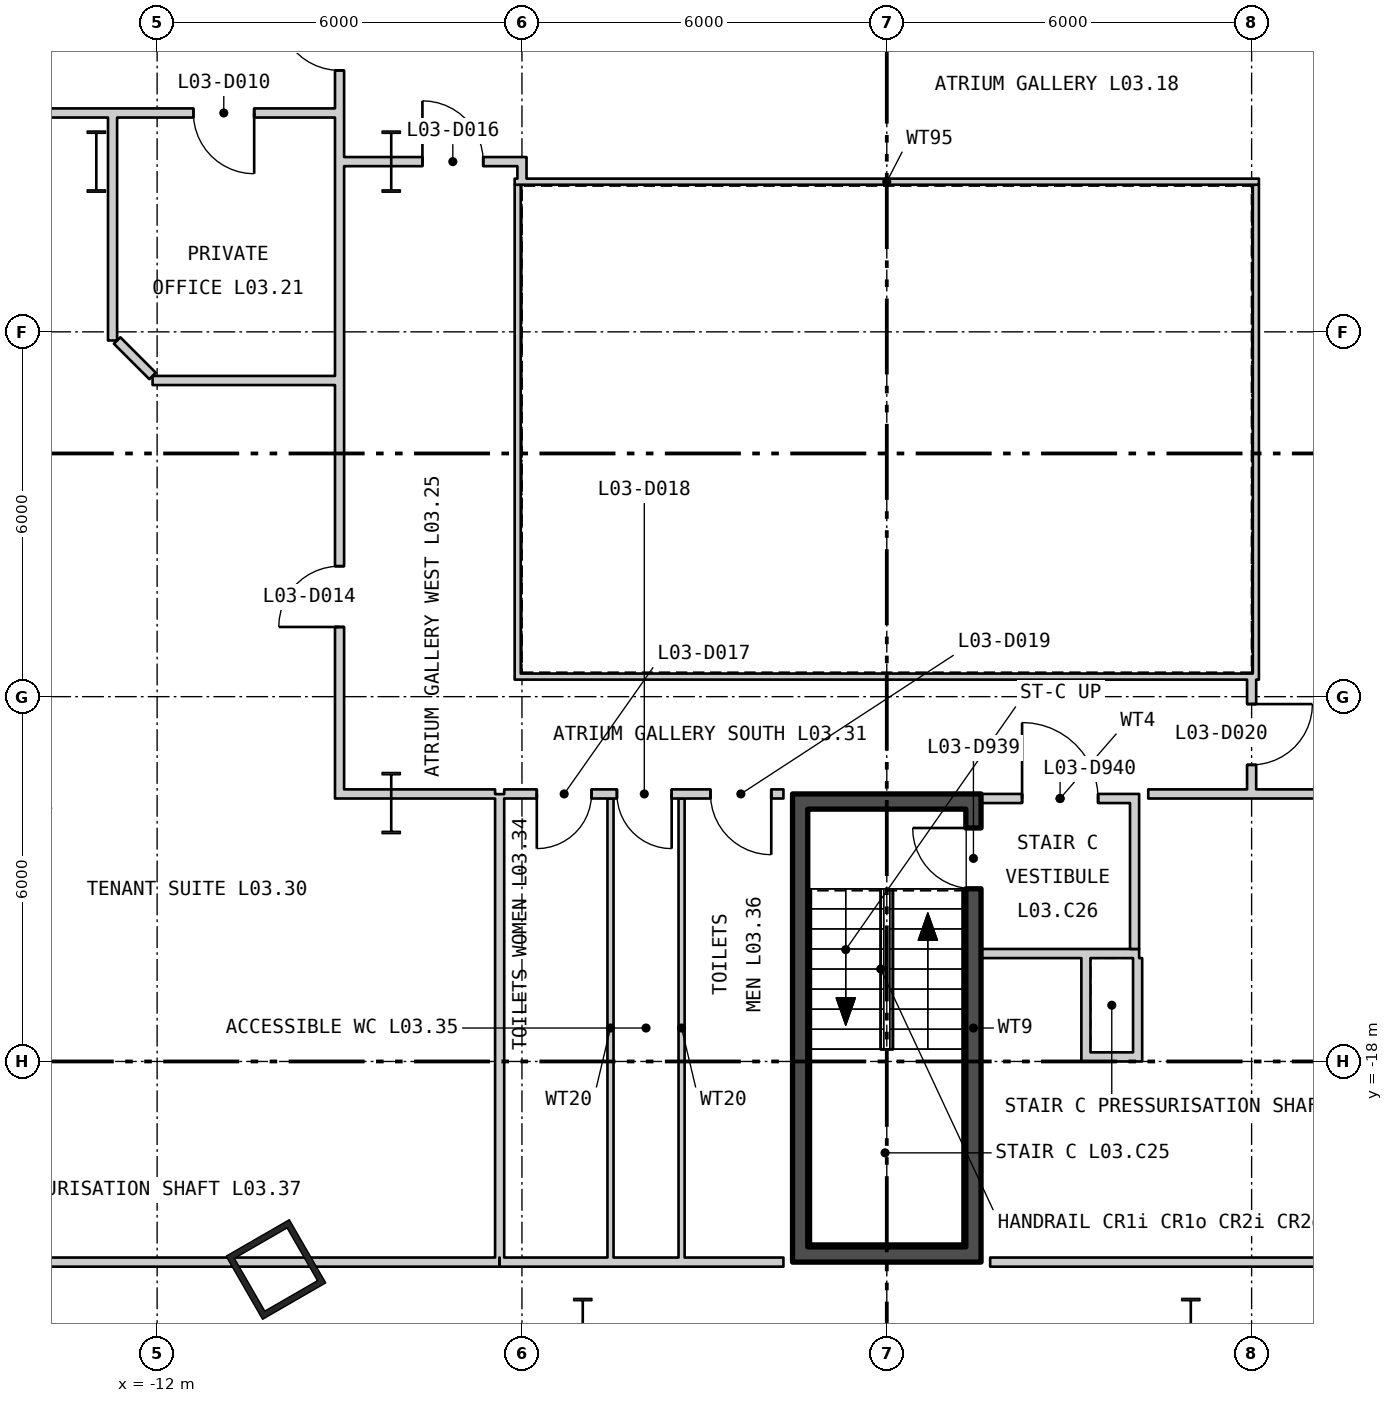
"""IFC4 building model, lengths in metres.
Left out: names, types, materials, properties, quantities, classifications, styles, units other than length and angle.
Written with IfcOpenShell. Run it as: python <this file> out.ifc"""

import sys

from ifc_helpers import new_model, si_unit, direction, frame, frame_2d, origin, origin_2d, place, context, subcontext, project, spatial, rectangle, hollow_rectangle, i_section, extrude, element, fill, save


model = new_model("IFC4")
c1 = context("Model", 3, precision=1e-05, world=origin(), true_north=direction((0.0, 1.0)))
c2 = subcontext(c1, "Body", "Model", "MODEL_VIEW")
j1 = project(units=[si_unit("LENGTHUNIT", "METRE"), si_unit("PLANEANGLEUNIT", "RADIAN")], contexts=[c1])
p1 = place(None, origin())
s1 = spatial("IfcSite", under=j1, at=p1, CompositionType="ELEMENT")
p2 = place(p1, origin())
s2 = spatial("IfcBuilding", under=s1, at=p2, CompositionType="ELEMENT")
p3 = place(p2, frame((0.0, 0.0, 18.6)))
s3 = spatial("IfcBuildingStorey", under=s2, at=p3, CompositionType="ELEMENT", Elevation=18.6)
p4 = place(p3, frame((-10.046, -21.422, 0.0), z_axis=(0.0, 0.0, 1.0), x_axis=(0.5, -0.866025403784, 0.0)))
e1 = element("IfcColumn", 1, at=p4, inside=s3, PredefinedType="COLUMN", context=c2, shape_type="SweptSolid", body=[
    extrude(hollow_rectangle(XDim=1.2, YDim=1.2, WallThickness=0.1, at=origin_2d()), origin(), (0.0, 0.0, 1.0), 5.1),
])
for number, where, z_axis, x_axis in (
    (2, (-8.15, -3.2, 0.0), (0.0, 0.0, 1.0), (1.0, 0.0, 0.0)),
    (3, (-8.15, -13.75, 0.0), (0.0, 0.0, 1.0), (1.0, 0.0, 0.0)),
    (4, (5.0, -22.4, 0.0), (0.0, 0.0, 1.0), (1.0, 0.0, 0.0)),
    (5, (-5.0, -22.4, 0.0), (0.0, 0.0, 1.0), (1.0, 0.0, 0.0)),
    (6, (-13.0, -3.2, 0.0), (0.0, 0.0, 1.0), (1.0, 0.0, 0.0)),
):
    element("IfcColumn", number, at=place(p3, frame(where, z_axis=z_axis, x_axis=x_axis)), inside=s3, PredefinedType="COLUMN", context=c2, shape_type="SweptSolid", body=[
        extrude(i_section(OverallWidth=0.302, OverallDepth=1.008, WebThickness=0.021, FlangeThickness=0.04, at=origin_2d()), origin(), (0.0, 0.0, 1.0), 5.1),
    ])
p5 = place(p3, frame((-6.12, -11.67, 0.0), z_axis=(0.0, 0.0, 1.0), x_axis=(1.0, 0.0, 0.0)))
e7 = element("IfcWall", 7, at=p5, inside=s3, PredefinedType="PARTITIONING", context=c2, shape_type="SweptSolid", body=[
    extrude(rectangle(XDim=12.24, YDim=0.1, at=frame_2d((6.12, 0.0))), origin(), (0.0, 0.0, 1.0), 4.88),
])
p6 = place(p3, frame((6.07, -11.62, 0.0), z_axis=(0.0, 0.0, 1.0), x_axis=(0.0, 1.0, 0.0)))
e8 = element("IfcWall", 8, at=p6, inside=s3, PredefinedType="PARTITIONING", context=c2, shape_type="SweptSolid", body=[
    extrude(rectangle(XDim=8.04, YDim=0.1, at=frame_2d((4.02, 0.0))), origin(), (0.0, 0.0, 1.0), 4.88),
])
p7 = place(p3, frame((6.12, -3.53, 0.0), z_axis=(0.0, 0.0, 1.0), x_axis=(-1.0, 0.0, 0.0)))
e9 = element("IfcWall", 9, at=p7, inside=s3, PredefinedType="PARTITIONING", context=c2, shape_type="SweptSolid", body=[
    extrude(rectangle(XDim=12.24, YDim=0.1, at=frame_2d((6.12, 0.0))), origin(), (0.0, 0.0, 1.0), 4.88),
])
p8 = place(p3, frame((-6.07, -3.58, 0.0), z_axis=(0.0, 0.0, 1.0), x_axis=(0.0, -1.0, 0.0)))
e10 = element("IfcWall", 10, at=p8, inside=s3, PredefinedType="PARTITIONING", context=c2, shape_type="SweptSolid", body=[
    extrude(rectangle(XDim=8.04, YDim=0.1, at=frame_2d((4.02, 0.0))), origin(), (0.0, 0.0, 1.0), 4.88),
])
p9 = place(p3, frame((-1.425, -21.05, 0.0), z_axis=(0.0, 0.0, 1.0), x_axis=(0.0, 1.0, 0.0)))
e11 = element("IfcWall", 11, at=p9, inside=s3, PredefinedType="SHEAR", context=c2, shape_type="SweptSolid", body=[
    extrude(rectangle(XDim=7.2, YDim=0.25, at=frame_2d((3.6, 0.0))), origin(), (0.0, 0.0, 1.0), 4.88),
])
p10 = place(p3, frame((1.425, -21.05, 0.0), z_axis=(0.0, 0.0, 1.0), x_axis=(0.0, 1.0, 0.0)))
e12 = element("IfcWall", 12, at=p10, inside=s3, PredefinedType="SHEAR", context=c2, shape_type="SweptSolid", body=[
    extrude(rectangle(XDim=7.2, YDim=0.25, at=frame_2d((3.6, 0.0))), origin(), (0.0, 0.0, 1.0), 4.88),
])
p11 = place(p10, frame((5.89, 0.0, 0.0)))
e13 = element("IfcOpeningElement", 13, at=p11, cuts=e12, PredefinedType="OPENING", context=c2, shape_type="SweptSolid", body=[
    extrude(rectangle(XDim=1.0, YDim=2.1, at=frame_2d((0.5, 1.05))), frame((0.0, 0.135, 0.0), z_axis=(0.0, -1.0, 0.0), x_axis=(1.0, 0.0, 0.0)), (0.0, 0.0, 1.0), 0.27),
])
for number, where, z_axis, x_axis in (
    (14, (-1.55, -21.175, 0.0), (0.0, 0.0, 1.0), (1.0, 0.0, 0.0)),
    (15, (-1.55, -13.725, 0.0), (0.0, 0.0, 1.0), (1.0, 0.0, 0.0)),
):
    element("IfcWall", number, at=place(p3, frame(where, z_axis=z_axis, x_axis=x_axis)), inside=s3, PredefinedType="SHEAR", context=c2, shape_type="SweptSolid", body=[
        extrude(rectangle(XDim=3.1, YDim=0.25, at=frame_2d((1.55, 0.0))), origin(), (0.0, 0.0, 1.0), 4.88),
    ])
p12 = place(p3, frame((1.55, -16.225, 0.0), z_axis=(0.0, 0.0, 1.0), x_axis=(1.0, 0.0, 0.0)))
e16 = element("IfcWall", 16, at=p12, inside=s3, PredefinedType="PARTITIONING", context=c2, shape_type="SweptSolid", body=[
    extrude(rectangle(XDim=2.6, YDim=0.15, at=frame_2d((1.3, 0.0))), origin(), (0.0, 0.0, 1.0), 4.88),
])
p13 = place(p3, frame((4.075, -16.15, 0.0), z_axis=(0.0, 0.0, 1.0), x_axis=(0.0, 1.0, 0.0)))
e17 = element("IfcWall", 17, at=p13, inside=s3, PredefinedType="PARTITIONING", context=c2, shape_type="SweptSolid", body=[
    extrude(rectangle(XDim=2.4, YDim=0.15, at=frame_2d((1.2, 0.0))), origin(), (0.0, 0.0, 1.0), 4.88),
])
p14 = place(p3, frame((1.55, -13.675, 0.0), z_axis=(0.0, 0.0, 1.0), x_axis=(1.0, 0.0, 0.0)))
e18 = element("IfcWall", 18, at=p14, inside=s3, PredefinedType="PARTITIONING", context=c2, shape_type="SweptSolid", body=[
    extrude(rectangle(XDim=2.6, YDim=0.15, at=frame_2d((1.3, 0.0))), origin(), (0.0, 0.0, 1.0), 3.97),
])
p15 = place(p14, frame((0.675, 0.0, 0.0)))
e19 = element("IfcOpeningElement", 19, at=p15, cuts=e18, PredefinedType="OPENING", context=c2, shape_type="SweptSolid", body=[
    extrude(rectangle(XDim=1.25, YDim=2.1, at=frame_2d((0.625, 1.05))), frame((0.0, 0.085, 0.0), z_axis=(0.0, -1.0, 0.0), x_axis=(1.0, 0.0, 0.0)), (0.0, 0.0, 1.0), 0.17),
])
p16 = place(p3, frame((3.275, -18.0, 0.0), z_axis=(0.0, 0.0, 1.0), x_axis=(0.0, 1.0, 0.0)))
e20 = element("IfcWall", 20, at=p16, inside=s3, PredefinedType="PARTITIONING", context=c2, shape_type="SweptSolid", body=[
    extrude(rectangle(XDim=1.7, YDim=0.15, at=frame_2d((0.85, 0.0))), origin(), (0.0, 0.0, 1.0), 4.28),
])
p17 = place(p3, frame((3.35, -17.925, 0.0), z_axis=(0.0, 0.0, 1.0), x_axis=(1.0, 0.0, 0.0)))
e21 = element("IfcWall", 21, at=p17, inside=s3, PredefinedType="PARTITIONING", context=c2, shape_type="SweptSolid", body=[
    extrude(rectangle(XDim=0.7, YDim=0.15, at=frame_2d((0.35, 0.0))), origin(), (0.0, 0.0, 1.0), 4.88),
])
p18 = place(p3, frame((4.125, -18.0, 0.0), z_axis=(0.0, 0.0, 1.0), x_axis=(0.0, 1.0, 0.0)))
e22 = element("IfcWall", 22, at=p18, inside=s3, PredefinedType="PARTITIONING", context=c2, shape_type="SweptSolid", body=[
    extrude(rectangle(XDim=1.7, YDim=0.15, at=frame_2d((0.85, 0.0))), origin(), (0.0, 0.0, 1.0), 4.88),
])
p19 = place(p3, frame((-17.025, -21.3, 0.0), z_axis=(0.0, 0.0, 1.0), x_axis=(1.0, 0.0, 0.0)))
e23 = element("IfcWall", 23, at=p19, inside=s3, PredefinedType="PARTITIONING", context=c2, shape_type="SweptSolid", body=[
    extrude(rectangle(XDim=10.655, YDim=0.15, at=frame_2d((5.327, 0.0))), origin(), (0.0, 0.0, 1.0), 4.88),
])
p20 = place(p3, frame((-17.025, -2.4, 0.0), z_axis=(0.0, 0.0, 1.0), x_axis=(1.0, 0.0, 0.0)))
e24 = element("IfcWall", 24, at=p20, inside=s3, PredefinedType="PARTITIONING", context=c2, shape_type="SweptSolid", body=[
    extrude(rectangle(XDim=7.95, YDim=0.15, at=frame_2d((3.975, 0.0))), origin(), (0.0, 0.0, 1.0), 4.88),
])
p21 = place(p20, frame((5.621, 0.0, 0.0)))
e25 = element("IfcOpeningElement", 25, at=p21, cuts=e24, PredefinedType="OPENING", context=c2, shape_type="SweptSolid", body=[
    extrude(rectangle(XDim=1.0, YDim=2.1, at=frame_2d((0.5, 1.05))), frame((0.0, 0.085, 0.0), z_axis=(0.0, -1.0, 0.0), x_axis=(1.0, 0.0, 0.0)), (0.0, 0.0, 1.0), 0.17),
])
p22 = place(p3, frame((-12.733, -6.142, 0.0), z_axis=(0.0, 0.0, 1.0), x_axis=(0.0, 1.0, 0.0)))
e26 = element("IfcWall", 26, at=p22, inside=s3, PredefinedType="PARTITIONING", context=c2, shape_type="SweptSolid", body=[
    extrude(rectangle(XDim=3.042, YDim=0.15, at=frame_2d((1.521, 0.0))), origin(), (0.0, 0.0, 1.0), 4.19),
])
p23 = place(p3, frame((-12.733, -3.1, 0.0), z_axis=(0.0, 0.0, 1.0), x_axis=(0.0, 1.0, 0.0)))
e27 = element("IfcWall", 27, at=p23, inside=s3, PredefinedType="PARTITIONING", context=c2, shape_type="SweptSolid", body=[
    extrude(rectangle(XDim=0.625, YDim=0.15, at=frame_2d((0.312, 0.0))), origin(), (0.0, 0.0, 1.0), 4.28),
])
p24 = place(p3, frame((-12.658, -6.142, 0.0), z_axis=(0.0, 0.0, 1.0), x_axis=(0.707106781187, -0.707106781187, 0.0)))
e28 = element("IfcWall", 28, at=p24, inside=s3, PredefinedType="PARTITIONING", context=c2, shape_type="SweptSolid", body=[
    extrude(rectangle(XDim=0.825, YDim=0.15, at=frame_2d((0.412, 0.0))), origin(), (0.0, 0.0, 1.0), 4.88),
])
p25 = place(p3, frame((-12.075, -6.8, 0.0), z_axis=(0.0, 0.0, 1.0), x_axis=(1.0, 0.0, 0.0)))
e29 = element("IfcWall", 29, at=p25, inside=s3, PredefinedType="PARTITIONING", context=c2, shape_type="SweptSolid", body=[
    extrude(rectangle(XDim=3.0, YDim=0.15, at=frame_2d((1.5, 0.0))), origin(), (0.0, 0.0, 1.0), 4.88),
])
p26 = place(p3, frame((-9.0, -13.675, 0.0), z_axis=(0.0, 0.0, 1.0), x_axis=(0.0, 1.0, 0.0)))
e30 = element("IfcWall", 30, at=p26, inside=s3, PredefinedType="PARTITIONING", context=c2, shape_type="SweptSolid", body=[
    extrude(rectangle(XDim=13.675, YDim=0.15, at=frame_2d((6.838, 0.0))), origin(), (0.0, 0.0, 1.0), 4.88),
])
p27 = place(p26, frame((2.821, 0.0, 0.0)))
e31 = element("IfcOpeningElement", 31, at=p27, cuts=e30, PredefinedType="OPENING", context=c2, shape_type="SweptSolid", body=[
    extrude(rectangle(XDim=1.0, YDim=2.1, at=frame_2d((0.5, 1.05))), frame((0.0, 0.085, 0.0), z_axis=(0.0, -1.0, 0.0), x_axis=(1.0, 0.0, 0.0)), (0.0, 0.0, 1.0), 0.17),
])
p28 = place(p26, frame((11.975, 0.0, 0.0)))
e32 = element("IfcOpeningElement", 32, at=p28, cuts=e30, PredefinedType="OPENING", context=c2, shape_type="SweptSolid", body=[
    extrude(rectangle(XDim=1.0, YDim=2.1, at=frame_2d((0.5, 1.05))), frame((0.0, 0.085, 0.0), z_axis=(0.0, -1.0, 0.0), x_axis=(1.0, 0.0, 0.0)), (0.0, 0.0, 1.0), 0.17),
])
p29 = place(p3, frame((-8.925, -13.6, 0.0), z_axis=(0.0, 0.0, 1.0), x_axis=(1.0, 0.0, 0.0)))
e33 = element("IfcWall", 33, at=p29, inside=s3, PredefinedType="PARTITIONING", context=c2, shape_type="SweptSolid", body=[
    extrude(rectangle(XDim=0.775, YDim=0.15, at=frame_2d((0.388, 0.0))), origin(), (0.0, 0.0, 1.0), 4.09),
])
p30 = place(p3, frame((-8.15, -13.6, 0.0), z_axis=(0.0, 0.0, 1.0), x_axis=(1.0, 0.0, 0.0)))
e34 = element("IfcWall", 34, at=p30, inside=s3, PredefinedType="PARTITIONING", context=c2, shape_type="SweptSolid", body=[
    extrude(rectangle(XDim=1.708, YDim=0.15, at=frame_2d((0.854, 0.0))), origin(), (0.0, 0.0, 1.0), 3.97),
])
p31 = place(p3, frame((-8.925, -3.2, 0.0), z_axis=(0.0, 0.0, 1.0), x_axis=(1.0, 0.0, 0.0)))
e35 = element("IfcWall", 35, at=p31, inside=s3, PredefinedType="PARTITIONING", context=c2, shape_type="SweptSolid", body=[
    extrude(rectangle(XDim=0.775, YDim=0.15, at=frame_2d((0.388, 0.0))), origin(), (0.0, 0.0, 1.0), 4.09),
])
p32 = place(p3, frame((-8.15, -3.2, 0.0), z_axis=(0.0, 0.0, 1.0), x_axis=(1.0, 0.0, 0.0)))
e36 = element("IfcWall", 36, at=p32, inside=s3, PredefinedType="PARTITIONING", context=c2, shape_type="SweptSolid", body=[
    extrude(rectangle(XDim=2.225, YDim=0.15, at=frame_2d((1.113, 0.0))), origin(), (0.0, 0.0, 1.0), 3.97),
])
p33 = place(p32, frame((0.513, 0.0, 0.0)))
e37 = element("IfcOpeningElement", 37, at=p33, cuts=e36, PredefinedType="OPENING", context=c2, shape_type="SweptSolid", body=[
    extrude(rectangle(XDim=1.0, YDim=2.1, at=frame_2d((0.5, 1.05))), frame((0.0, 0.085, 0.0), z_axis=(0.0, -1.0, 0.0), x_axis=(1.0, 0.0, 0.0)), (0.0, 0.0, 1.0), 0.17),
])
p34 = place(p3, frame((-6.367, -21.3, 0.0), z_axis=(0.0, 0.0, 1.0), x_axis=(1.0, 0.0, 0.0)))
e38 = element("IfcWall", 38, at=p34, inside=s3, PredefinedType="PARTITIONING", context=c2, shape_type="SweptSolid", body=[
    extrude(rectangle(XDim=4.667, YDim=0.15, at=frame_2d((2.333, 0.0))), origin(), (0.0, 0.0, 1.0), 4.88),
])
p35 = place(p3, frame((-6.367, -21.225, 0.0), z_axis=(0.0, 0.0, 1.0), x_axis=(0.0, 1.0, 0.0)))
e39 = element("IfcWall", 39, at=p35, inside=s3, PredefinedType="PARTITIONING", context=c2, shape_type="SweptSolid", body=[
    extrude(rectangle(XDim=7.622, YDim=0.15, at=frame_2d((3.811, 0.0))), origin(), (0.0, 0.0, 1.0), 4.28),
])
p36 = place(p3, frame((-6.292, -13.6, 0.0), z_axis=(0.0, 0.0, 1.0), x_axis=(1.0, 0.0, 0.0)))
e40 = element("IfcWall", 40, at=p36, inside=s3, PredefinedType="PARTITIONING", context=c2, shape_type="SweptSolid", body=[
    extrude(rectangle(XDim=4.592, YDim=0.15, at=frame_2d((2.296, 0.0))), origin(), (0.0, 0.0, 1.0), 3.97),
])
p37 = place(p36, frame((0.536, 0.0, 0.0)))
e41 = element("IfcOpeningElement", 41, at=p37, cuts=e40, PredefinedType="OPENING", context=c2, shape_type="SweptSolid", body=[
    extrude(rectangle(XDim=0.9, YDim=2.1, at=frame_2d((0.45, 1.05))), frame((0.0, 0.085, 0.0), z_axis=(0.0, -1.0, 0.0), x_axis=(1.0, 0.0, 0.0)), (0.0, 0.0, 1.0), 0.17),
])
p38 = place(p36, frame((1.854, 0.0, 0.0)))
e42 = element("IfcOpeningElement", 42, at=p38, cuts=e40, PredefinedType="OPENING", context=c2, shape_type="SweptSolid", body=[
    extrude(rectangle(XDim=0.9, YDim=2.1, at=frame_2d((0.45, 1.05))), frame((0.0, 0.085, 0.0), z_axis=(0.0, -1.0, 0.0), x_axis=(1.0, 0.0, 0.0)), (0.0, 0.0, 1.0), 0.17),
])
p39 = place(p36, frame((3.392, 0.0, 0.0)))
e43 = element("IfcOpeningElement", 43, at=p39, cuts=e40, PredefinedType="OPENING", context=c2, shape_type="SweptSolid", body=[
    extrude(rectangle(XDim=1.0, YDim=2.1, at=frame_2d((0.5, 1.05))), frame((0.0, 0.085, 0.0), z_axis=(0.0, -1.0, 0.0), x_axis=(1.0, 0.0, 0.0)), (0.0, 0.0, 1.0), 0.17),
])
p40 = place(p3, frame((-6.0, -3.48, 0.0), z_axis=(0.0, 0.0, 1.0), x_axis=(0.0, 1.0, 0.0)))
e44 = element("IfcWall", 44, at=p40, inside=s3, PredefinedType="PARTITIONING", context=c2, shape_type="SweptSolid", body=[
    extrude(rectangle(XDim=0.205, YDim=0.15, at=frame_2d((0.102, 0.0))), origin(), (0.0, 0.0, 1.0), 4.88),
])
for number, where, z_axis, x_axis in (
    (45, (-4.544, -21.225, 0.0), (0.0, 0.0, 1.0), (0.0, 1.0, 0.0)),
    (46, (-3.375, -21.225, 0.0), (0.0, 0.0, 1.0), (0.0, 1.0, 0.0)),
):
    element("IfcWall", number, at=place(p3, frame(where, z_axis=z_axis, x_axis=x_axis)), inside=s3, PredefinedType="PARTITIONING", context=c2, shape_type="SweptSolid", body=[
        extrude(rectangle(XDim=7.55, YDim=0.1, at=frame_2d((3.775, 0.0))), origin(), (0.0, 0.0, 1.0), 4.88),
    ])
p41 = place(p3, frame((1.7, -21.3, 0.0), z_axis=(0.0, 0.0, 1.0), x_axis=(1.0, 0.0, 0.0)))
e47 = element("IfcWall", 47, at=p41, inside=s3, PredefinedType="PARTITIONING", context=c2, shape_type="SweptSolid", body=[
    extrude(rectangle(XDim=15.325, YDim=0.15, at=frame_2d((7.662, 0.0))), origin(), (0.0, 0.0, 1.0), 4.88),
])
p42 = place(p3, frame((4.3, -13.6, 0.0), z_axis=(0.0, 0.0, 1.0), x_axis=(1.0, 0.0, 0.0)))
e48 = element("IfcWall", 48, at=p42, inside=s3, PredefinedType="PARTITIONING", context=c2, shape_type="SweptSolid", body=[
    extrude(rectangle(XDim=3.85, YDim=0.15, at=frame_2d((1.925, 0.0))), origin(), (0.0, 0.0, 1.0), 3.97),
])
p43 = place(p3, frame((6.0, -13.525, 0.0), z_axis=(0.0, 0.0, 1.0), x_axis=(0.0, 1.0, 0.0)))
e49 = element("IfcWall", 49, at=p43, inside=s3, PredefinedType="PARTITIONING", context=c2, shape_type="SweptSolid", body=[
    extrude(rectangle(XDim=1.805, YDim=0.15, at=frame_2d((0.902, 0.0))), origin(), (0.0, 0.0, 1.0), 4.88),
])
p44 = place(p43, frame((0.403, 0.0, 0.0)))
e50 = element("IfcOpeningElement", 50, at=p44, cuts=e49, PredefinedType="OPENING", context=c2, shape_type="SweptSolid", body=[
    extrude(rectangle(XDim=1.0, YDim=2.1, at=frame_2d((0.5, 1.05))), frame((0.0, 0.085, 0.0), z_axis=(0.0, -1.0, 0.0), x_axis=(1.0, 0.0, 0.0)), (0.0, 0.0, 1.0), 0.17),
])
p45 = place(p11, origin())
e51 = element("IfcDoor", 51, at=p45, inside=s3, OperationType="SINGLE_SWING_LEFT", PredefinedType="DOOR", context=c2, shape_type="SweptSolid", body=[
    extrude(rectangle(XDim=1.0, YDim=2.1, at=frame_2d((0.5, 1.05))), frame((0.0, 0.025, 0.0), z_axis=(0.0, -1.0, 0.0), x_axis=(1.0, 0.0, 0.0)), (0.0, 0.0, 1.0), 0.05),
])
fill(e13, e51)
p46 = place(p15, origin())
e52 = element("IfcDoor", 52, at=p46, inside=s3, OperationType="SINGLE_SWING_RIGHT", PredefinedType="DOOR", context=c2, shape_type="SweptSolid", body=[
    extrude(rectangle(XDim=1.25, YDim=2.1, at=frame_2d((0.625, 1.05))), frame((0.0, 0.025, 0.0), z_axis=(0.0, -1.0, 0.0), x_axis=(1.0, 0.0, 0.0)), (0.0, 0.0, 1.0), 0.05),
])
fill(e19, e52)
p47 = place(p21, origin())
e53 = element("IfcDoor", 53, at=p47, inside=s3, OperationType="SINGLE_SWING_RIGHT", PredefinedType="DOOR", context=c2, shape_type="SweptSolid", body=[
    extrude(rectangle(XDim=1.0, YDim=2.1, at=frame_2d((0.5, 1.05))), frame((0.0, 0.025, 0.0), z_axis=(0.0, -1.0, 0.0), x_axis=(1.0, 0.0, 0.0)), (0.0, 0.0, 1.0), 0.05),
])
fill(e25, e53)
p48 = place(p27, origin())
e54 = element("IfcDoor", 54, at=p48, inside=s3, OperationType="SINGLE_SWING_RIGHT", PredefinedType="DOOR", context=c2, shape_type="SweptSolid", body=[
    extrude(rectangle(XDim=1.0, YDim=2.1, at=frame_2d((0.5, 1.05))), frame((0.0, 0.025, 0.0), z_axis=(0.0, -1.0, 0.0), x_axis=(1.0, 0.0, 0.0)), (0.0, 0.0, 1.0), 0.05),
])
fill(e31, e54)
p49 = place(p28, origin())
e55 = element("IfcDoor", 55, at=p49, inside=s3, OperationType="SINGLE_SWING_LEFT", PredefinedType="DOOR", context=c2, shape_type="SweptSolid", body=[
    extrude(rectangle(XDim=1.0, YDim=2.1, at=frame_2d((0.5, 1.05))), frame((0.0, 0.025, 0.0), z_axis=(0.0, -1.0, 0.0), x_axis=(1.0, 0.0, 0.0)), (0.0, 0.0, 1.0), 0.05),
])
fill(e32, e55)
p50 = place(p33, origin())
e56 = element("IfcDoor", 56, at=p50, inside=s3, OperationType="SINGLE_SWING_RIGHT", PredefinedType="DOOR", context=c2, shape_type="SweptSolid", body=[
    extrude(rectangle(XDim=1.0, YDim=2.1, at=frame_2d((0.5, 1.05))), frame((0.0, 0.025, 0.0), z_axis=(0.0, -1.0, 0.0), x_axis=(1.0, 0.0, 0.0)), (0.0, 0.0, 1.0), 0.05),
])
fill(e37, e56)
p51 = place(p37, origin())
e57 = element("IfcDoor", 57, at=p51, inside=s3, OperationType="SINGLE_SWING_LEFT", PredefinedType="DOOR", context=c2, shape_type="SweptSolid", body=[
    extrude(rectangle(XDim=0.9, YDim=2.1, at=frame_2d((0.45, 1.05))), frame((0.0, 0.025, 0.0), z_axis=(0.0, -1.0, 0.0), x_axis=(1.0, 0.0, 0.0)), (0.0, 0.0, 1.0), 0.05),
])
fill(e41, e57)
p52 = place(p38, origin())
e58 = element("IfcDoor", 58, at=p52, inside=s3, OperationType="SINGLE_SWING_RIGHT", PredefinedType="DOOR", context=c2, shape_type="SweptSolid", body=[
    extrude(rectangle(XDim=0.9, YDim=2.1, at=frame_2d((0.45, 1.05))), frame((0.0, 0.025, 0.0), z_axis=(0.0, -1.0, 0.0), x_axis=(1.0, 0.0, 0.0)), (0.0, 0.0, 1.0), 0.05),
])
fill(e42, e58)
p53 = place(p39, origin())
e59 = element("IfcDoor", 59, at=p53, inside=s3, OperationType="SINGLE_SWING_RIGHT", PredefinedType="DOOR", context=c2, shape_type="SweptSolid", body=[
    extrude(rectangle(XDim=1.0, YDim=2.1, at=frame_2d((0.5, 1.05))), frame((0.0, 0.025, 0.0), z_axis=(0.0, -1.0, 0.0), x_axis=(1.0, 0.0, 0.0)), (0.0, 0.0, 1.0), 0.05),
])
fill(e43, e59)
p54 = place(p44, origin())
e60 = element("IfcDoor", 60, at=p54, inside=s3, OperationType="SINGLE_SWING_RIGHT", PredefinedType="DOOR", context=c2, shape_type="SweptSolid", body=[
    extrude(rectangle(XDim=1.0, YDim=2.1, at=frame_2d((0.5, 1.05))), frame((0.0, 0.025, 0.0), z_axis=(0.0, -1.0, 0.0), x_axis=(1.0, 0.0, 0.0)), (0.0, 0.0, 1.0), 0.05),
])
fill(e50, e60)
save(model, sys.argv[1])
